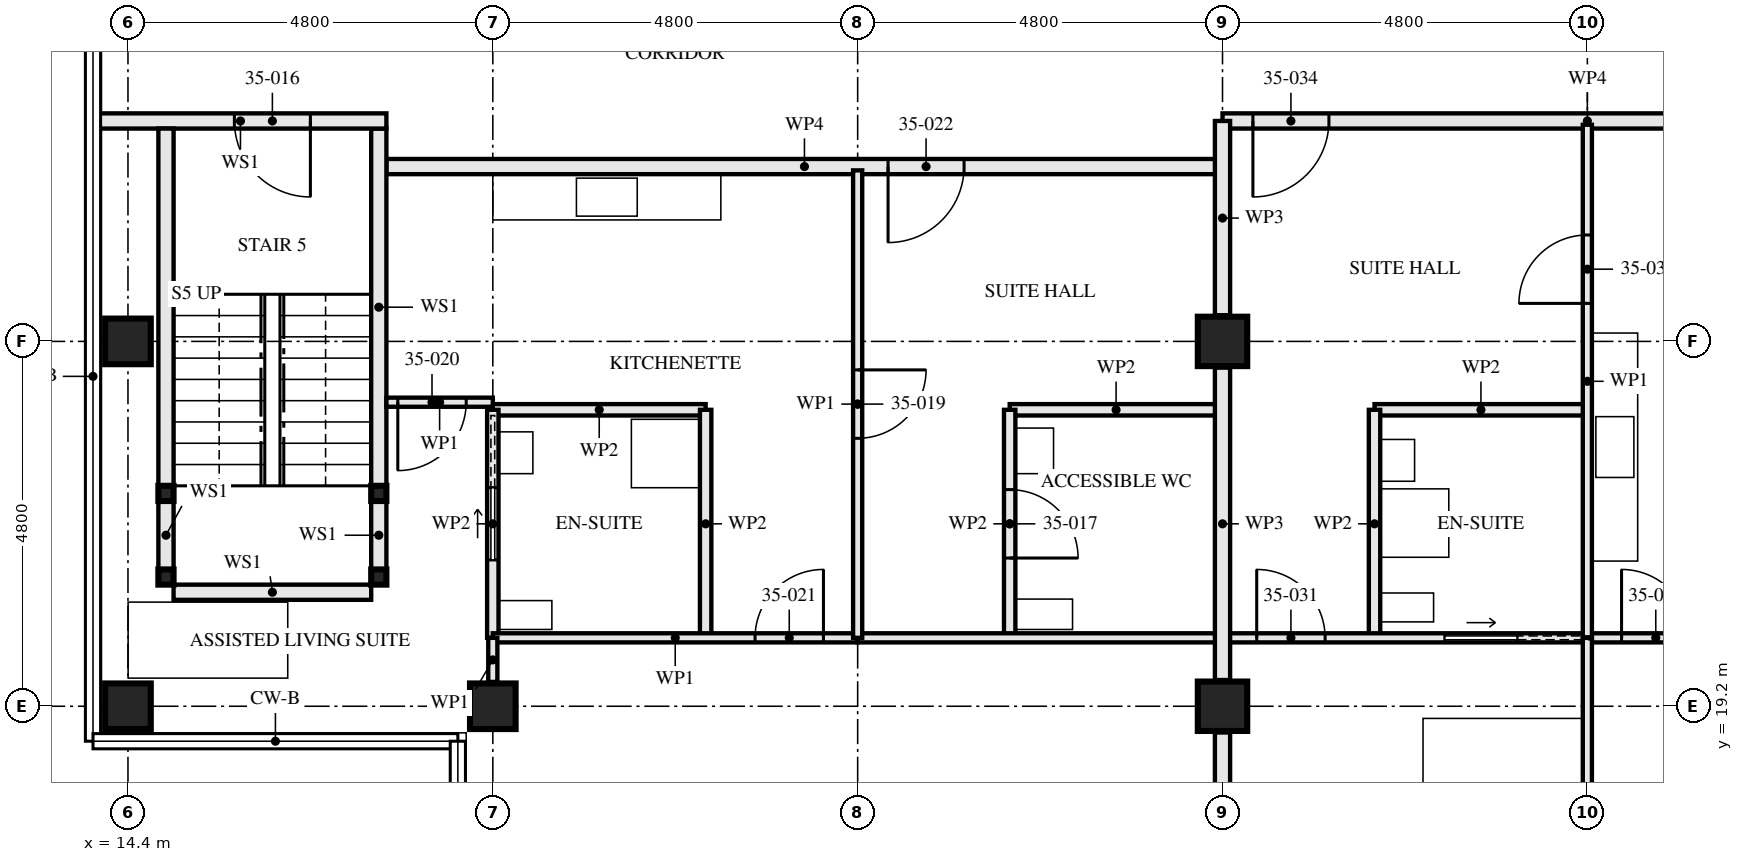
"""IFC4 building model, lengths in metres.
Left out: names, types, materials, properties, quantities, classifications, styles, units other than length and angle.
Written with IfcOpenShell. Run it as: python <this file> out.ifc"""

import sys

from ifc_helpers import new_model, si_unit, direction, frame, frame_2d, origin, origin_2d, place, context, subcontext, project, spatial, rectangle, hollow_rectangle, extrude, element, fill, save


model = new_model("IFC4")
c1 = context("Model", 3, precision=1e-05, world=origin(), true_north=direction((0.0, 1.0)))
c2 = subcontext(c1, "Body", "Model", "MODEL_VIEW")
j1 = project(units=[si_unit("LENGTHUNIT", "METRE"), si_unit("PLANEANGLEUNIT", "RADIAN")], contexts=[c1])
p1 = place(None, origin())
s1 = spatial("IfcSite", under=j1, at=p1, CompositionType="ELEMENT")
p2 = place(p1, origin())
s2 = spatial("IfcBuilding", under=s1, at=p2, CompositionType="ELEMENT")
p3 = place(p2, frame((0.0, 0.0, 129.5)))
s3 = spatial("IfcBuildingStorey", under=s2, at=p3, CompositionType="ELEMENT", Elevation=129.5)
for number, where, z_axis, x_axis in (
    (1, (14.4, 19.2, 0.0), (0.0, 0.0, 1.0), (0.0, 1.0, 0.0)),
    (2, (14.4, 24.0, 0.0), (0.0, 0.0, 1.0), (1.0, 0.0, 0.0)),
    (3, (19.2, 19.2, 0.0), (0.0, 0.0, 1.0), (0.0, 1.0, 0.0)),
):
    element("IfcColumn", number, at=place(p3, frame(where, z_axis=z_axis, x_axis=x_axis)), inside=s3, PredefinedType="COLUMN", context=c2, shape_type="SweptSolid", body=[
        extrude(hollow_rectangle(XDim=0.6, YDim=0.6, WallThickness=0.08, at=origin_2d()), origin(), (0.0, 0.0, 1.0), 3.5),
    ])
for number, where, z_axis, x_axis in (
    (4, (28.8, 19.2, 0.0), (0.0, 0.0, 1.0), (1.0, 0.0, 0.0)),
    (5, (28.8, 24.0, 0.0), (0.0, 0.0, 1.0), (1.0, 0.0, 0.0)),
):
    element("IfcColumn", number, at=place(p3, frame(where, z_axis=z_axis, x_axis=x_axis)), inside=s3, PredefinedType="COLUMN", context=c2, shape_type="SweptSolid", body=[
        extrude(hollow_rectangle(XDim=0.65, YDim=0.65, WallThickness=0.05, at=origin_2d()), origin(), (0.0, 0.0, 1.0), 3.5),
    ])
for number, where, z_axis, x_axis in (
    (6, (14.9, 20.9, 0.0), (0.0, 0.0, 1.0), (1.0, 0.0, 0.0)),
    (7, (17.7, 20.9, 0.0), (0.0, 0.0, 1.0), (1.0, 0.0, 0.0)),
    (8, (14.9, 22.0, 0.0), (0.0, 0.0, 1.0), (1.0, 0.0, 0.0)),
    (9, (17.7, 22.0, 0.0), (0.0, 0.0, 1.0), (1.0, 0.0, 0.0)),
):
    element("IfcColumn", number, at=place(p3, frame(where, z_axis=z_axis, x_axis=x_axis)), inside=s3, PredefinedType="COLUMN", context=c2, shape_type="SweptSolid", body=[
        extrude(hollow_rectangle(XDim=0.2, YDim=0.2, WallThickness=0.008, at=origin_2d()), origin(), (0.0, 0.0, 1.0), 3.33),
    ])
p4 = place(p3, frame((14.9, 21.0, 0.0), z_axis=(0.0, 0.0, 1.0), x_axis=(0.0, 1.0, 0.0)))
e10 = element("IfcWall", 10, at=p4, inside=s3, PredefinedType="SOLIDWALL", context=c2, shape_type="SweptSolid", body=[
    extrude(rectangle(XDim=0.9, YDim=0.2, at=frame_2d((0.45, 0.0))), origin(), (0.0, 0.0, 1.0), 2.99),
])
p5 = place(p3, frame((14.9, 22.1, 0.0), z_axis=(0.0, 0.0, 1.0), x_axis=(0.0, 1.0, 0.0)))
e11 = element("IfcWall", 11, at=p5, inside=s3, PredefinedType="SOLIDWALL", context=c2, shape_type="SweptSolid", body=[
    extrude(rectangle(XDim=4.7, YDim=0.2, at=frame_2d((2.35, 0.0))), origin(), (0.0, 0.0, 1.0), 2.99),
])
p6 = place(p3, frame((17.7, 21.0, 0.0), z_axis=(0.0, 0.0, 1.0), x_axis=(0.0, 1.0, 0.0)))
e12 = element("IfcWall", 12, at=p6, inside=s3, PredefinedType="SOLIDWALL", context=c2, shape_type="SweptSolid", body=[
    extrude(rectangle(XDim=0.9, YDim=0.2, at=frame_2d((0.45, 0.0))), origin(), (0.0, 0.0, 1.0), 2.99),
])
p7 = place(p3, frame((17.7, 22.1, 0.0), z_axis=(0.0, 0.0, 1.0), x_axis=(0.0, 1.0, 0.0)))
e13 = element("IfcWall", 13, at=p7, inside=s3, PredefinedType="SOLIDWALL", context=c2, shape_type="SweptSolid", body=[
    extrude(rectangle(XDim=4.7, YDim=0.2, at=frame_2d((2.35, 0.0))), origin(), (0.0, 0.0, 1.0), 2.99),
])
p8 = place(p3, frame((15.0, 20.7, 0.0), z_axis=(0.0, 0.0, 1.0), x_axis=(1.0, 0.0, 0.0)))
e14 = element("IfcWall", 14, at=p8, inside=s3, PredefinedType="SOLIDWALL", context=c2, shape_type="SweptSolid", body=[
    extrude(rectangle(XDim=2.6, YDim=0.2, at=frame_2d((1.3, 0.0))), origin(), (0.0, 0.0, 1.0), 3.33),
])
p9 = place(p3, frame((13.96, 26.9, 0.0), z_axis=(0.0, 0.0, 1.0), x_axis=(1.0, 0.0, 0.0)))
e15 = element("IfcWall", 15, at=p9, inside=s3, PredefinedType="SOLIDWALL", context=c2, shape_type="SweptSolid", body=[
    extrude(rectangle(XDim=3.84, YDim=0.2, at=frame_2d((1.92, 0.0))), origin(), (0.0, 0.0, 1.0), 2.32),
])
p10 = place(p9, frame((1.84, 0.0, 0.0)))
e16 = element("IfcOpeningElement", 16, at=p10, cuts=e15, PredefinedType="OPENING", context=c2, shape_type="SweptSolid", body=[
    extrude(rectangle(XDim=1.0, YDim=2.1, at=frame_2d((0.5, 1.05))), frame((0.0, 0.111, 0.0), z_axis=(0.0, -1.0, 0.0), x_axis=(1.0, 0.0, 0.0)), (0.0, 0.0, 1.0), 0.221),
])
p11 = place(p3, frame((26.0, 20.1, 0.0), z_axis=(0.0, 0.0, 1.0), x_axis=(0.0, 1.0, 0.0)))
e17 = element("IfcWall", 17, at=p11, inside=s3, PredefinedType="PARTITIONING", context=c2, shape_type="SweptSolid", body=[
    extrude(rectangle(XDim=3.0, YDim=0.15, at=frame_2d((1.5, 0.0))), origin(), (0.0, 0.0, 1.0), 3.33),
])
p12 = place(p11, frame((1.05, 0.0, 0.0)))
e18 = element("IfcOpeningElement", 18, at=p12, cuts=e17, PredefinedType="OPENING", context=c2, shape_type="SweptSolid", body=[
    extrude(rectangle(XDim=0.9, YDim=2.1, at=frame_2d((0.45, 1.05))), frame((0.0, 0.085, 0.0), z_axis=(0.0, -1.0, 0.0), x_axis=(1.0, 0.0, 0.0)), (0.0, 0.0, 1.0), 0.171),
])
p13 = place(p3, frame((26.0, 23.1, 0.0), z_axis=(0.0, 0.0, 1.0), x_axis=(1.0, 0.0, 0.0)))
e19 = element("IfcWall", 19, at=p13, inside=s3, PredefinedType="PARTITIONING", context=c2, shape_type="SweptSolid", body=[
    extrude(rectangle(XDim=2.8, YDim=0.15, at=frame_2d((1.4, 0.0))), origin(), (0.0, 0.0, 1.0), 3.33),
])
p14 = place(p3, frame((19.2, 20.1, 0.0), z_axis=(0.0, 0.0, 1.0), x_axis=(0.0, 1.0, 0.0)))
e20 = element("IfcWall", 20, at=p14, inside=s3, PredefinedType="PARTITIONING", context=c2, shape_type="SweptSolid", body=[
    extrude(rectangle(XDim=3.0, YDim=0.15, at=frame_2d((1.5, 0.0))), origin(), (0.0, 0.0, 1.0), 2.55),
])
p15 = place(p14, frame((1.025, 0.0, 0.0)))
e21 = element("IfcOpeningElement", 21, at=p15, cuts=e20, PredefinedType="OPENING", context=c2, shape_type="SweptSolid", body=[
    extrude(rectangle(XDim=0.95, YDim=2.1, at=frame_2d((0.475, 1.05))), frame((0.0, 0.085, 0.0), z_axis=(0.0, -1.0, 0.0), x_axis=(1.0, 0.0, 0.0)), (0.0, 0.0, 1.0), 0.171),
])
p16 = place(p3, frame((22.0, 20.1, 0.0), z_axis=(0.0, 0.0, 1.0), x_axis=(0.0, 1.0, 0.0)))
e22 = element("IfcWall", 22, at=p16, inside=s3, PredefinedType="PARTITIONING", context=c2, shape_type="SweptSolid", body=[
    extrude(rectangle(XDim=3.0, YDim=0.15, at=frame_2d((1.5, 0.0))), origin(), (0.0, 0.0, 1.0), 3.33),
])
p17 = place(p3, frame((19.2, 23.1, 0.0), z_axis=(0.0, 0.0, 1.0), x_axis=(1.0, 0.0, 0.0)))
e23 = element("IfcWall", 23, at=p17, inside=s3, PredefinedType="PARTITIONING", context=c2, shape_type="SweptSolid", body=[
    extrude(rectangle(XDim=2.8, YDim=0.15, at=frame_2d((1.4, 0.0))), origin(), (0.0, 0.0, 1.0), 3.33),
])
p18 = place(p3, frame((24.0, 20.1, 0.0), z_axis=(0.0, 0.0, 1.0), x_axis=(0.0, 1.0, 0.0)))
e24 = element("IfcWall", 24, at=p18, inside=s3, PredefinedType="PARTITIONING", context=c2, shape_type="SweptSolid", body=[
    extrude(rectangle(XDim=6.15, YDim=0.12, at=frame_2d((3.075, 0.0))), origin(), (0.0, 0.0, 1.0), 2.55),
])
p19 = place(p18, frame((2.625, 0.0, 0.0)))
e25 = element("IfcOpeningElement", 25, at=p19, cuts=e24, PredefinedType="OPENING", context=c2, shape_type="SweptSolid", body=[
    extrude(rectangle(XDim=0.9, YDim=2.1, at=frame_2d((0.45, 1.05))), frame((0.0, 0.071, 0.0), z_axis=(0.0, -1.0, 0.0), x_axis=(1.0, 0.0, 0.0)), (0.0, 0.0, 1.0), 0.141),
])
p20 = place(p3, frame((17.8, 23.2, 0.0), z_axis=(0.0, 0.0, 1.0), x_axis=(1.0, 0.0, 0.0)))
e26 = element("IfcWall", 26, at=p20, inside=s3, PredefinedType="PARTITIONING", context=c2, shape_type="SweptSolid", body=[
    extrude(rectangle(XDim=1.4, YDim=0.12, at=frame_2d((0.7, 0.0))), origin(), (0.0, 0.0, 1.0), 3.33),
])
p21 = place(p20, frame((0.15, 0.0, 0.0)))
e27 = element("IfcOpeningElement", 27, at=p21, cuts=e26, PredefinedType="OPENING", context=c2, shape_type="SweptSolid", body=[
    extrude(rectangle(XDim=0.9, YDim=2.1, at=frame_2d((0.45, 1.05))), frame((0.0, 0.071, 0.0), z_axis=(0.0, -1.0, 0.0), x_axis=(1.0, 0.0, 0.0)), (0.0, 0.0, 1.0), 0.141),
])
p22 = place(p3, frame((19.2, 20.1, 0.0), z_axis=(0.0, 0.0, 1.0), x_axis=(1.0, 0.0, 0.0)))
e28 = element("IfcWall", 28, at=p22, inside=s3, PredefinedType="PARTITIONING", context=c2, shape_type="SweptSolid", body=[
    extrude(rectangle(XDim=4.8, YDim=0.12, at=frame_2d((2.4, 0.0))), origin(), (0.0, 0.0, 1.0), 3.33),
])
p23 = place(p22, frame((3.45, 0.0, 0.0)))
e29 = element("IfcOpeningElement", 29, at=p23, cuts=e28, PredefinedType="OPENING", context=c2, shape_type="SweptSolid", body=[
    extrude(rectangle(XDim=0.9, YDim=2.1, at=frame_2d((0.45, 1.05))), frame((0.0, 0.071, 0.0), z_axis=(0.0, -1.0, 0.0), x_axis=(1.0, 0.0, 0.0)), (0.0, 0.0, 1.0), 0.141),
])
p24 = place(p3, frame((24.0, 20.1, 0.0), z_axis=(0.0, 0.0, 1.0), x_axis=(1.0, 0.0, 0.0)))
e30 = element("IfcWall", 30, at=p24, inside=s3, PredefinedType="PARTITIONING", context=c2, shape_type="SweptSolid", body=[
    extrude(rectangle(XDim=4.8, YDim=0.12, at=frame_2d((2.4, 0.0))), origin(), (0.0, 0.0, 1.0), 3.33),
])
p25 = place(p3, frame((19.2, 19.52, 0.0), z_axis=(0.0, 0.0, 1.0), x_axis=(0.0, 1.0, 0.0)))
e31 = element("IfcWall", 31, at=p25, inside=s3, PredefinedType="PARTITIONING", context=c2, shape_type="SweptSolid", body=[
    extrude(rectangle(XDim=0.58, YDim=0.12, at=frame_2d((0.29, 0.0))), origin(), (0.0, 0.0, 1.0), 2.55),
])
p26 = place(p3, frame((17.8, 26.3, 0.0), z_axis=(0.0, 0.0, 1.0), x_axis=(1.0, 0.0, 0.0)))
e32 = element("IfcWall", 32, at=p26, inside=s3, PredefinedType="PARTITIONING", context=c2, shape_type="SweptSolid", body=[
    extrude(rectangle(XDim=11.0, YDim=0.2, at=frame_2d((5.5, 0.0))), origin(), (0.0, 0.0, 1.0), 2.55),
])
p27 = place(p26, frame((6.6, 0.0, 0.0)))
e33 = element("IfcOpeningElement", 33, at=p27, cuts=e32, PredefinedType="OPENING", context=c2, shape_type="SweptSolid", body=[
    extrude(rectangle(XDim=1.0, YDim=2.1, at=frame_2d((0.5, 1.05))), frame((0.0, 0.111, 0.0), z_axis=(0.0, -1.0, 0.0), x_axis=(1.0, 0.0, 0.0)), (0.0, 0.0, 1.0), 0.221),
])
p28 = place(p3, frame((30.8, 20.1, 0.0), z_axis=(0.0, 0.0, 1.0), x_axis=(0.0, 1.0, 0.0)))
e34 = element("IfcWall", 34, at=p28, inside=s3, PredefinedType="PARTITIONING", context=c2, shape_type="SweptSolid", body=[
    extrude(rectangle(XDim=3.0, YDim=0.15, at=frame_2d((1.5, 0.0))), origin(), (0.0, 0.0, 1.0), 3.33),
])
p29 = place(p3, frame((30.8, 23.1, 0.0), z_axis=(0.0, 0.0, 1.0), x_axis=(1.0, 0.0, 0.0)))
e35 = element("IfcWall", 35, at=p29, inside=s3, PredefinedType="PARTITIONING", context=c2, shape_type="SweptSolid", body=[
    extrude(rectangle(XDim=2.8, YDim=0.15, at=frame_2d((1.4, 0.0))), origin(), (0.0, 0.0, 1.0), 3.33),
])
p30 = place(p3, frame((33.6, 20.1, 0.0), z_axis=(0.0, 0.0, 1.0), x_axis=(0.0, 1.0, 0.0)))
e36 = element("IfcWall", 36, at=p30, inside=s3, PredefinedType="PARTITIONING", context=c2, shape_type="SweptSolid", body=[
    extrude(rectangle(XDim=6.75, YDim=0.12, at=frame_2d((3.375, 0.0))), origin(), (0.0, 0.0, 1.0), 2.55),
])
p31 = place(p30, frame((4.4, 0.0, 0.0)))
e37 = element("IfcOpeningElement", 37, at=p31, cuts=e36, PredefinedType="OPENING", context=c2, shape_type="SweptSolid", body=[
    extrude(rectangle(XDim=0.9, YDim=2.1, at=frame_2d((0.45, 1.05))), frame((0.0, 0.071, 0.0), z_axis=(0.0, -1.0, 0.0), x_axis=(1.0, 0.0, 0.0)), (0.0, 0.0, 1.0), 0.141),
])
p32 = place(p3, frame((28.8, 20.1, 0.0), z_axis=(0.0, 0.0, 1.0), x_axis=(1.0, 0.0, 0.0)))
e38 = element("IfcWall", 38, at=p32, inside=s3, PredefinedType="PARTITIONING", context=c2, shape_type="SweptSolid", body=[
    extrude(rectangle(XDim=4.8, YDim=0.12, at=frame_2d((2.4, 0.0))), origin(), (0.0, 0.0, 1.0), 3.33),
])
p33 = place(p32, frame((0.45, 0.0, 0.0)))
e39 = element("IfcOpeningElement", 39, at=p33, cuts=e38, PredefinedType="OPENING", context=c2, shape_type="SweptSolid", body=[
    extrude(rectangle(XDim=0.9, YDim=2.1, at=frame_2d((0.45, 1.05))), frame((0.0, 0.071, 0.0), z_axis=(0.0, -1.0, 0.0), x_axis=(1.0, 0.0, 0.0)), (0.0, 0.0, 1.0), 0.141),
])
p34 = place(p32, frame((2.925, 0.0, 0.0)))
e40 = element("IfcOpeningElement", 40, at=p34, cuts=e38, PredefinedType="OPENING", context=c2, shape_type="SweptSolid", body=[
    extrude(rectangle(XDim=0.95, YDim=2.1, at=frame_2d((0.475, 1.05))), frame((0.0, 0.071, 0.0), z_axis=(0.0, -1.0, 0.0), x_axis=(1.0, 0.0, 0.0)), (0.0, 0.0, 1.0), 0.141),
])
p35 = place(p3, frame((33.6, 20.1, 0.0), z_axis=(0.0, 0.0, 1.0), x_axis=(1.0, 0.0, 0.0)))
e41 = element("IfcWall", 41, at=p35, inside=s3, PredefinedType="PARTITIONING", context=c2, shape_type="SweptSolid", body=[
    extrude(rectangle(XDim=4.8, YDim=0.12, at=frame_2d((2.4, 0.0))), origin(), (0.0, 0.0, 1.0), 3.33),
])
p36 = place(p35, frame((0.45, 0.0, 0.0)))
e42 = element("IfcOpeningElement", 42, at=p36, cuts=e41, PredefinedType="OPENING", context=c2, shape_type="SweptSolid", body=[
    extrude(rectangle(XDim=0.9, YDim=2.1, at=frame_2d((0.45, 1.05))), frame((0.0, 0.071, 0.0), z_axis=(0.0, -1.0, 0.0), x_axis=(1.0, 0.0, 0.0)), (0.0, 0.0, 1.0), 0.141),
])
p37 = place(p3, frame((33.6, 14.72, 0.0), z_axis=(0.0, 0.0, 1.0), x_axis=(0.0, 1.0, 0.0)))
e43 = element("IfcWall", 43, at=p37, inside=s3, PredefinedType="PARTITIONING", context=c2, shape_type="SweptSolid", body=[
    extrude(rectangle(XDim=5.38, YDim=0.12, at=frame_2d((2.69, 0.0))), origin(), (0.0, 0.0, 1.0), 2.55),
])
p38 = place(p3, frame((28.8, 26.9, 0.0), z_axis=(0.0, 0.0, 1.0), x_axis=(1.0, 0.0, 0.0)))
e44 = element("IfcWall", 44, at=p38, inside=s3, PredefinedType="PARTITIONING", context=c2, shape_type="SweptSolid", body=[
    extrude(rectangle(XDim=9.6, YDim=0.2, at=frame_2d((4.8, 0.0))), origin(), (0.0, 0.0, 1.0), 3.33),
])
p39 = place(p38, frame((0.4, 0.0, 0.0)))
e45 = element("IfcOpeningElement", 45, at=p39, cuts=e44, PredefinedType="OPENING", context=c2, shape_type="SweptSolid", body=[
    extrude(rectangle(XDim=1.0, YDim=2.1, at=frame_2d((0.5, 1.05))), frame((0.0, 0.111, 0.0), z_axis=(0.0, -1.0, 0.0), x_axis=(1.0, 0.0, 0.0)), (0.0, 0.0, 1.0), 0.221),
])
p40 = place(p3, frame((28.8, 14.72, 0.0), z_axis=(0.0, 0.0, 1.0), x_axis=(0.0, 1.0, 0.0)))
e46 = element("IfcWall", 46, at=p40, inside=s3, PredefinedType="PARTITIONING", context=c2, shape_type="SweptSolid", body=[
    extrude(rectangle(XDim=4.135, YDim=0.2, at=frame_2d((2.067, 0.0))), origin(), (0.0, 0.0, 1.0), 2.32),
])
p41 = place(p3, frame((28.8, 19.545, 0.0), z_axis=(0.0, 0.0, 1.0), x_axis=(0.0, 1.0, 0.0)))
e47 = element("IfcWall", 47, at=p41, inside=s3, PredefinedType="PARTITIONING", context=c2, shape_type="SweptSolid", body=[
    extrude(rectangle(XDim=4.11, YDim=0.2, at=frame_2d((2.055, 0.0))), origin(), (0.0, 0.0, 1.0), 2.32),
])
p42 = place(p3, frame((28.8, 24.345, 0.0), z_axis=(0.0, 0.0, 1.0), x_axis=(0.0, 1.0, 0.0)))
e48 = element("IfcWall", 48, at=p42, inside=s3, PredefinedType="PARTITIONING", context=c2, shape_type="SweptSolid", body=[
    extrude(rectangle(XDim=2.555, YDim=0.2, at=frame_2d((1.277, 0.0))), origin(), (0.0, 0.0, 1.0), 2.32),
])
p43 = place(p10, frame((1.0, 0.0, 0.0), z_axis=(0.0, 0.0, 1.0), x_axis=(-1.0, 0.0, 0.0)))
e49 = element("IfcDoor", 49, at=p43, inside=s3, OperationType="SINGLE_SWING_RIGHT", PredefinedType="DOOR", context=c2, shape_type="SweptSolid", body=[
    extrude(rectangle(XDim=1.0, YDim=2.1, at=frame_2d((0.5, 1.05))), frame((0.0, 0.032, 0.0), z_axis=(0.0, -1.0, 0.0), x_axis=(1.0, 0.0, 0.0)), (0.0, 0.0, 1.0), 0.064),
])
fill(e16, e49)
p44 = place(p12, frame((0.9, 0.0, 0.0), z_axis=(0.0, 0.0, 1.0), x_axis=(-1.0, 0.0, 0.0)))
e50 = element("IfcDoor", 50, at=p44, inside=s3, OperationType="SINGLE_SWING_LEFT", PredefinedType="DOOR", context=c2, shape_type="SweptSolid", body=[
    extrude(rectangle(XDim=0.9, YDim=2.1, at=frame_2d((0.45, 1.05))), frame((0.0, 0.022, 0.0), z_axis=(0.0, -1.0, 0.0), x_axis=(1.0, 0.0, 0.0)), (0.0, 0.0, 1.0), 0.044),
])
fill(e18, e50)
p45 = place(p15, origin())
e51 = element("IfcDoor", 51, at=p45, inside=s3, OperationType="SLIDING_TO_LEFT", PredefinedType="DOOR", context=c2, shape_type="SweptSolid", body=[
    extrude(rectangle(XDim=0.95, YDim=2.1, at=frame_2d((0.475, 1.05))), frame((0.0, 0.022, 0.0), z_axis=(0.0, -1.0, 0.0), x_axis=(1.0, 0.0, 0.0)), (0.0, 0.0, 1.0), 0.044),
])
fill(e21, e51)
p46 = place(p19, frame((0.9, 0.0, 0.0), z_axis=(0.0, 0.0, 1.0), x_axis=(-1.0, 0.0, 0.0)))
e52 = element("IfcDoor", 52, at=p46, inside=s3, OperationType="SINGLE_SWING_RIGHT", PredefinedType="DOOR", context=c2, shape_type="SweptSolid", body=[
    extrude(rectangle(XDim=0.9, YDim=2.1, at=frame_2d((0.45, 1.05))), frame((0.0, 0.022, 0.0), z_axis=(0.0, -1.0, 0.0), x_axis=(1.0, 0.0, 0.0)), (0.0, 0.0, 1.0), 0.044),
])
fill(e25, e52)
p47 = place(p21, frame((0.9, 0.0, 0.0), z_axis=(0.0, 0.0, 1.0), x_axis=(-1.0, 0.0, 0.0)))
e53 = element("IfcDoor", 53, at=p47, inside=s3, OperationType="SINGLE_SWING_LEFT", PredefinedType="DOOR", context=c2, shape_type="SweptSolid", body=[
    extrude(rectangle(XDim=0.9, YDim=2.1, at=frame_2d((0.45, 1.05))), frame((0.0, 0.022, 0.0), z_axis=(0.0, -1.0, 0.0), x_axis=(1.0, 0.0, 0.0)), (0.0, 0.0, 1.0), 0.044),
])
fill(e27, e53)
p48 = place(p23, origin())
e54 = element("IfcDoor", 54, at=p48, inside=s3, OperationType="SINGLE_SWING_LEFT", PredefinedType="DOOR", context=c2, shape_type="SweptSolid", body=[
    extrude(rectangle(XDim=0.9, YDim=2.1, at=frame_2d((0.45, 1.05))), frame((0.0, 0.022, 0.0), z_axis=(0.0, -1.0, 0.0), x_axis=(1.0, 0.0, 0.0)), (0.0, 0.0, 1.0), 0.044),
])
fill(e29, e54)
p49 = place(p27, frame((1.0, 0.0, 0.0), z_axis=(0.0, 0.0, 1.0), x_axis=(-1.0, 0.0, 0.0)))
e55 = element("IfcDoor", 55, at=p49, inside=s3, OperationType="SINGLE_SWING_LEFT", PredefinedType="DOOR", context=c2, shape_type="SweptSolid", body=[
    extrude(rectangle(XDim=1.0, YDim=2.1, at=frame_2d((0.5, 1.05))), frame((0.0, 0.027, 0.0), z_axis=(0.0, -1.0, 0.0), x_axis=(1.0, 0.0, 0.0)), (0.0, 0.0, 1.0), 0.054),
])
fill(e33, e55)
p50 = place(p31, origin())
e56 = element("IfcDoor", 56, at=p50, inside=s3, OperationType="SINGLE_SWING_RIGHT", PredefinedType="DOOR", context=c2, shape_type="SweptSolid", body=[
    extrude(rectangle(XDim=0.9, YDim=2.1, at=frame_2d((0.45, 1.05))), frame((0.0, 0.022, 0.0), z_axis=(0.0, -1.0, 0.0), x_axis=(1.0, 0.0, 0.0)), (0.0, 0.0, 1.0), 0.044),
])
fill(e37, e56)
p51 = place(p33, origin())
e57 = element("IfcDoor", 57, at=p51, inside=s3, OperationType="SINGLE_SWING_RIGHT", PredefinedType="DOOR", context=c2, shape_type="SweptSolid", body=[
    extrude(rectangle(XDim=0.9, YDim=2.1, at=frame_2d((0.45, 1.05))), frame((0.0, 0.022, 0.0), z_axis=(0.0, -1.0, 0.0), x_axis=(1.0, 0.0, 0.0)), (0.0, 0.0, 1.0), 0.044),
])
fill(e39, e57)
p52 = place(p34, origin())
e58 = element("IfcDoor", 58, at=p52, inside=s3, OperationType="SLIDING_TO_LEFT", PredefinedType="DOOR", context=c2, shape_type="SweptSolid", body=[
    extrude(rectangle(XDim=0.95, YDim=2.1, at=frame_2d((0.475, 1.05))), frame((0.0, 0.022, 0.0), z_axis=(0.0, -1.0, 0.0), x_axis=(1.0, 0.0, 0.0)), (0.0, 0.0, 1.0), 0.044),
])
fill(e40, e58)
p53 = place(p36, origin())
e59 = element("IfcDoor", 59, at=p53, inside=s3, OperationType="SINGLE_SWING_RIGHT", PredefinedType="DOOR", context=c2, shape_type="SweptSolid", body=[
    extrude(rectangle(XDim=0.9, YDim=2.1, at=frame_2d((0.45, 1.05))), frame((0.0, 0.022, 0.0), z_axis=(0.0, -1.0, 0.0), x_axis=(1.0, 0.0, 0.0)), (0.0, 0.0, 1.0), 0.044),
])
fill(e42, e59)
p54 = place(p39, frame((1.0, 0.0, 0.0), z_axis=(0.0, 0.0, 1.0), x_axis=(-1.0, 0.0, 0.0)))
e60 = element("IfcDoor", 60, at=p54, inside=s3, OperationType="SINGLE_SWING_LEFT", PredefinedType="DOOR", context=c2, shape_type="SweptSolid", body=[
    extrude(rectangle(XDim=1.0, YDim=2.1, at=frame_2d((0.5, 1.05))), frame((0.0, 0.027, 0.0), z_axis=(0.0, -1.0, 0.0), x_axis=(1.0, 0.0, 0.0)), (0.0, 0.0, 1.0), 0.054),
])
fill(e45, e60)
save(model, sys.argv[1])
